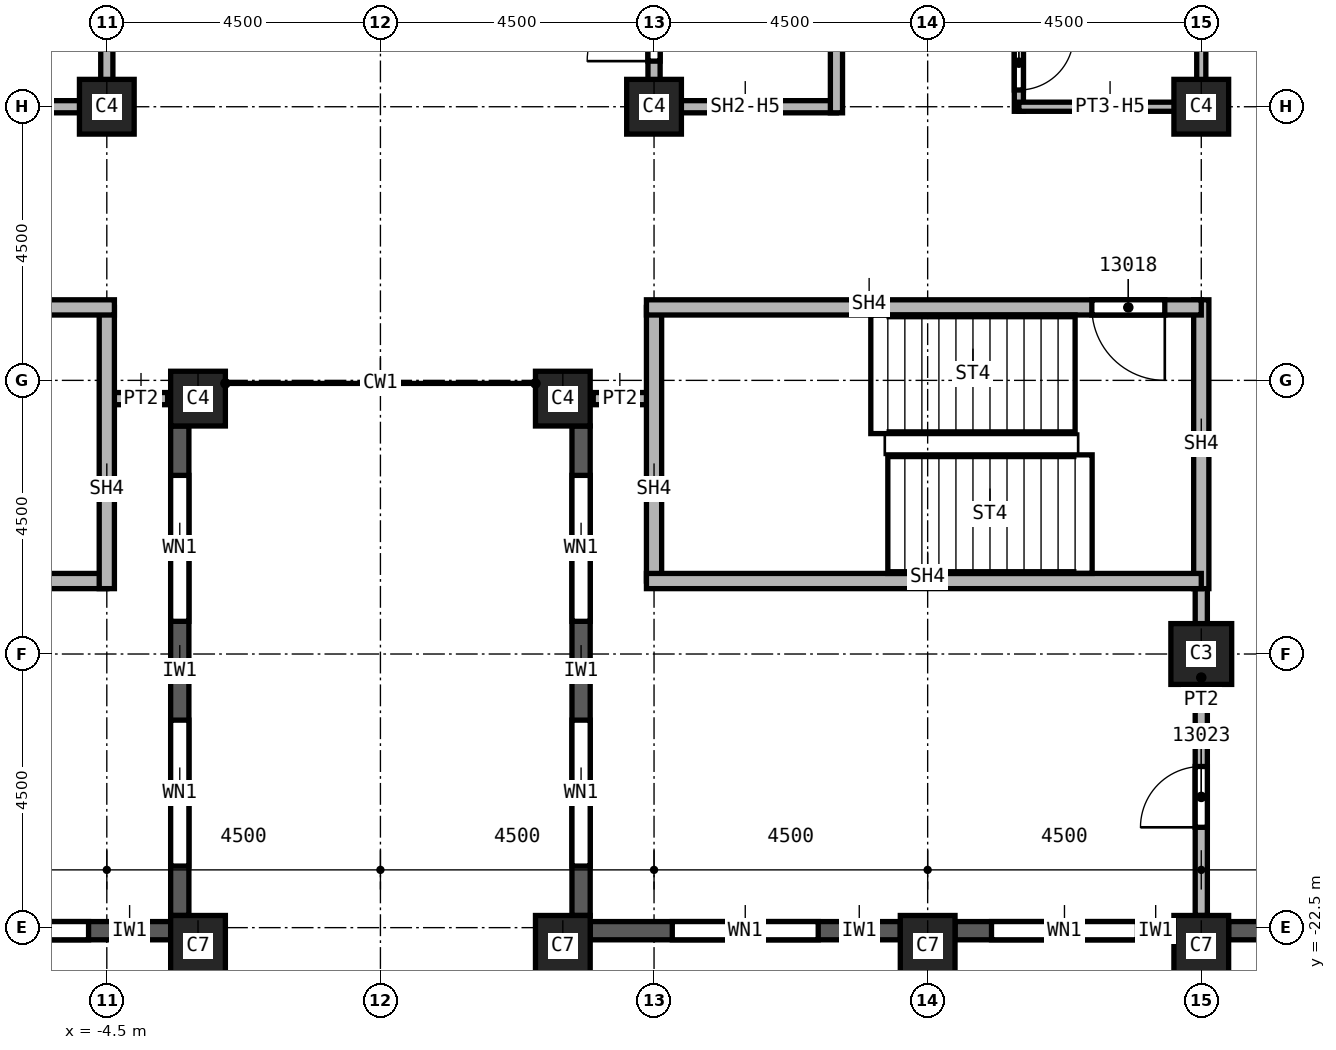
"""IFC4 building model, lengths in metres.
Left out: names, types, materials, properties, quantities, classifications, styles, units other than length and angle.
Written with IfcOpenShell. Run it as: python <this file> out.ifc"""

import sys

from ifc_helpers import new_model, si_unit, direction, frame, frame_2d, origin, origin_2d, place, context, subcontext, project, spatial, rectangle, extrude, element, fill, save


model = new_model("IFC4")
c1 = context("Model", 3, precision=1e-05, world=origin(), true_north=direction((0.0, 1.0)))
c2 = subcontext(c1, "Body", "Model", "MODEL_VIEW")
j1 = project(units=[si_unit("LENGTHUNIT", "METRE"), si_unit("PLANEANGLEUNIT", "RADIAN")], contexts=[c1])
p1 = place(None, origin())
s1 = spatial("IfcSite", under=j1, at=p1, CompositionType="ELEMENT")
p2 = place(p1, origin())
s2 = spatial("IfcBuilding", under=s1, at=p2, CompositionType="ELEMENT")
p3 = place(p2, frame((0.0, 0.0, 208.0)))
s3 = spatial("IfcBuildingStorey", under=s2, at=p3, CompositionType="ELEMENT", Elevation=208.0)
p4 = place(p3, frame((13.5, -18.0, 0.0), z_axis=(0.0, 0.0, 1.0), x_axis=(1.0, 0.0, 0.0)))
e1 = element("IfcColumn", 1, at=p4, inside=s3, PredefinedType="COLUMN", context=c2, shape_type="SweptSolid", body=[
    extrude(rectangle(XDim=1.0, YDim=1.0, at=origin_2d()), origin(), (0.0, 0.0, 1.0), 3.72),
])
for number, where, z_axis, x_axis in (
    (2, (4.5, -9.0, 0.0), (0.0, 0.0, 1.0), (1.0, 0.0, 0.0)),
    (3, (13.5, -9.0, 0.0), (0.0, 0.0, 1.0), (1.0, 0.0, 0.0)),
    (4, (-4.5, -9.0, 0.0), (0.0, 0.0, 1.0), (1.0, 0.0, 0.0)),
):
    element("IfcColumn", number, at=place(p3, frame(where, z_axis=z_axis, x_axis=x_axis)), inside=s3, PredefinedType="COLUMN", context=c2, shape_type="SweptSolid", body=[
        extrude(rectangle(XDim=0.9, YDim=0.9, at=origin_2d()), origin(), (0.0, 0.0, 1.0), 3.72),
    ])
for number, where, z_axis, x_axis in (
    (5, (3.0, -22.8, 0.0), (0.0, 0.0, 1.0), (1.0, 0.0, 0.0)),
    (6, (9.0, -22.8, 0.0), (0.0, 0.0, 1.0), (1.0, 0.0, 0.0)),
    (7, (13.5, -22.8, 0.0), (0.0, 0.0, 1.0), (1.0, 0.0, 0.0)),
    (8, (-3.0, -22.8, 0.0), (0.0, 0.0, 1.0), (1.0, 0.0, 0.0)),
):
    element("IfcColumn", number, at=place(p3, frame(where, z_axis=z_axis, x_axis=x_axis)), inside=s3, PredefinedType="COLUMN", context=c2, shape_type="SweptSolid", body=[
        extrude(rectangle(XDim=0.9, YDim=1.0, at=origin_2d()), origin(), (0.0, 0.0, 1.0), 3.72),
    ])
for number, where, z_axis, x_axis in (
    (9, (3.0, -13.8, 0.0), (0.0, 0.0, 1.0), (1.0, 0.0, 0.0)),
    (10, (-3.0, -13.8, 0.0), (0.0, 0.0, 1.0), (1.0, 0.0, 0.0)),
):
    element("IfcColumn", number, at=place(p3, frame(where, z_axis=z_axis, x_axis=x_axis)), inside=s3, PredefinedType="COLUMN", context=c2, shape_type="SweptSolid", body=[
        extrude(rectangle(XDim=0.9, YDim=0.9, at=origin_2d()), origin(), (0.0, 0.0, 1.0), 3.72),
    ])
p5 = place(p3, frame((-8.55, -22.55, 0.0), z_axis=(0.0, 0.0, 1.0), x_axis=(1.0, 0.0, 0.0)))
e11 = element("IfcWall", 11, at=p5, inside=s3, PredefinedType="SOLIDWALL", context=c2, shape_type="SweptSolid", body=[
    extrude(rectangle(XDim=5.1, YDim=0.3, at=frame_2d((2.55, 0.0))), origin(), (0.0, 0.0, 1.0), 3.12),
])
p6 = place(p5, frame((1.35, 0.0, 0.8)))
e12 = element("IfcOpeningElement", 12, at=p6, cuts=e11, PredefinedType="OPENING", context=c2, shape_type="SweptSolid", body=[
    extrude(rectangle(XDim=2.4, YDim=1.95, at=frame_2d((1.2, 0.975))), frame((0.0, 0.15, 0.0), z_axis=(0.0, -1.0, 0.0), x_axis=(1.0, 0.0, 0.0)), (0.0, 0.0, 1.0), 0.3),
])
p7 = place(p3, frame((-3.3, -22.3, 0.0), z_axis=(0.0, 0.0, 1.0), x_axis=(0.0, 1.0, 0.0)))
e13 = element("IfcWall", 13, at=p7, inside=s3, PredefinedType="SOLIDWALL", context=c2, shape_type="SweptSolid", body=[
    extrude(rectangle(XDim=8.05, YDim=0.3, at=frame_2d((4.025, 0.0))), origin(), (0.0, 0.0, 1.0), 3.12),
])
p8 = place(p7, frame((0.812, 0.0, 0.8)))
e14 = element("IfcOpeningElement", 14, at=p8, cuts=e13, PredefinedType="OPENING", context=c2, shape_type="SweptSolid", body=[
    extrude(rectangle(XDim=2.4, YDim=1.95, at=frame_2d((1.2, 0.975))), frame((0.0, 0.15, 0.0), z_axis=(0.0, -1.0, 0.0), x_axis=(1.0, 0.0, 0.0)), (0.0, 0.0, 1.0), 0.3),
])
p9 = place(p7, frame((4.837, 0.0, 0.8)))
e15 = element("IfcOpeningElement", 15, at=p9, cuts=e13, PredefinedType="OPENING", context=c2, shape_type="SweptSolid", body=[
    extrude(rectangle(XDim=2.4, YDim=1.95, at=frame_2d((1.2, 0.975))), frame((0.0, 0.15, 0.0), z_axis=(0.0, -1.0, 0.0), x_axis=(1.0, 0.0, 0.0)), (0.0, 0.0, 1.0), 0.3),
])
p10 = place(p3, frame((3.3, -14.25, 0.0), z_axis=(0.0, 0.0, 1.0), x_axis=(0.0, -1.0, 0.0)))
e16 = element("IfcWall", 16, at=p10, inside=s3, PredefinedType="SOLIDWALL", context=c2, shape_type="SweptSolid", body=[
    extrude(rectangle(XDim=8.05, YDim=0.3, at=frame_2d((4.025, 0.0))), origin(), (0.0, 0.0, 1.0), 3.12),
])
p11 = place(p10, frame((0.812, 0.0, 0.8)))
e17 = element("IfcOpeningElement", 17, at=p11, cuts=e16, PredefinedType="OPENING", context=c2, shape_type="SweptSolid", body=[
    extrude(rectangle(XDim=2.4, YDim=1.95, at=frame_2d((1.2, 0.975))), frame((0.0, 0.15, 0.0), z_axis=(0.0, -1.0, 0.0), x_axis=(1.0, 0.0, 0.0)), (0.0, 0.0, 1.0), 0.3),
])
p12 = place(p10, frame((4.837, 0.0, 0.8)))
e18 = element("IfcOpeningElement", 18, at=p12, cuts=e16, PredefinedType="OPENING", context=c2, shape_type="SweptSolid", body=[
    extrude(rectangle(XDim=2.4, YDim=1.95, at=frame_2d((1.2, 0.975))), frame((0.0, 0.15, 0.0), z_axis=(0.0, -1.0, 0.0), x_axis=(1.0, 0.0, 0.0)), (0.0, 0.0, 1.0), 0.3),
])
p13 = place(p3, frame((3.45, -22.55, 0.0), z_axis=(0.0, 0.0, 1.0), x_axis=(1.0, 0.0, 0.0)))
e19 = element("IfcWall", 19, at=p13, inside=s3, PredefinedType="SOLIDWALL", context=c2, shape_type="SweptSolid", body=[
    extrude(rectangle(XDim=5.1, YDim=0.3, at=frame_2d((2.55, 0.0))), origin(), (0.0, 0.0, 1.0), 3.12),
])
p14 = place(p13, frame((1.35, 0.0, 0.8)))
e20 = element("IfcOpeningElement", 20, at=p14, cuts=e19, PredefinedType="OPENING", context=c2, shape_type="SweptSolid", body=[
    extrude(rectangle(XDim=2.4, YDim=1.95, at=frame_2d((1.2, 0.975))), frame((0.0, 0.15, 0.0), z_axis=(0.0, -1.0, 0.0), x_axis=(1.0, 0.0, 0.0)), (0.0, 0.0, 1.0), 0.3),
])
p15 = place(p3, frame((9.45, -22.55, 0.0), z_axis=(0.0, 0.0, 1.0), x_axis=(1.0, 0.0, 0.0)))
e21 = element("IfcWall", 21, at=p15, inside=s3, PredefinedType="SOLIDWALL", context=c2, shape_type="SweptSolid", body=[
    extrude(rectangle(XDim=3.6, YDim=0.3, at=frame_2d((1.8, 0.0))), origin(), (0.0, 0.0, 1.0), 3.12),
])
p16 = place(p15, frame((0.6, 0.0, 0.8)))
e22 = element("IfcOpeningElement", 22, at=p16, cuts=e21, PredefinedType="OPENING", context=c2, shape_type="SweptSolid", body=[
    extrude(rectangle(XDim=2.4, YDim=1.95, at=frame_2d((1.2, 0.975))), frame((0.0, 0.15, 0.0), z_axis=(0.0, -1.0, 0.0), x_axis=(1.0, 0.0, 0.0)), (0.0, 0.0, 1.0), 0.3),
])
p17 = place(p3, frame((13.95, -22.55, 0.0), z_axis=(0.0, 0.0, 1.0), x_axis=(1.0, 0.0, 0.0)))
e23 = element("IfcWall", 23, at=p17, inside=s3, PredefinedType="SOLIDWALL", context=c2, shape_type="SweptSolid", body=[
    extrude(rectangle(XDim=3.6, YDim=0.3, at=frame_2d((1.8, 0.0))), origin(), (0.0, 0.0, 1.0), 3.12),
])
p18 = place(p17, frame((0.625, 0.0, 0.8)))
e24 = element("IfcOpeningElement", 24, at=p18, cuts=e23, PredefinedType="OPENING", context=c2, shape_type="SweptSolid", body=[
    extrude(rectangle(XDim=0.6, YDim=1.95, at=frame_2d((0.3, 0.975))), frame((0.0, 0.15, 0.0), z_axis=(0.0, -1.0, 0.0), x_axis=(1.0, 0.0, 0.0)), (0.0, 0.0, 1.0), 0.3),
])
p19 = place(p17, frame((1.825, 0.0, 0.8)))
e25 = element("IfcOpeningElement", 25, at=p19, cuts=e23, PredefinedType="OPENING", context=c2, shape_type="SweptSolid", body=[
    extrude(rectangle(XDim=1.0, YDim=1.95, at=frame_2d((0.5, 0.975))), frame((0.0, 0.15, 0.0), z_axis=(0.0, -1.0, 0.0), x_axis=(1.0, 0.0, 0.0)), (0.0, 0.0, 1.0), 0.3),
])
for number, where, z_axis, x_axis in (
    (26, (-3.5, -13.8, 0.0), (0.0, 0.0, 1.0), (-1.0, 0.0, 0.0)),
    (27, (4.5, -13.8, 0.0), (0.0, 0.0, 1.0), (-1.0, 0.0, 0.0)),
):
    element("IfcWall", number, at=place(p3, frame(where, z_axis=z_axis, x_axis=x_axis)), inside=s3, PredefinedType="PARTITIONING", context=c2, shape_type="SweptSolid", body=[
        extrude(rectangle(XDim=1.0, YDim=0.2, at=frame_2d((0.5, 0.0))), origin(), (0.0, 0.0, 1.0), 3.72),
    ])
p20 = place(p3, frame((13.5, -22.3, 0.0), z_axis=(0.0, 0.0, 1.0), x_axis=(0.0, 1.0, 0.0)))
e28 = element("IfcWall", 28, at=p20, inside=s3, PredefinedType="PARTITIONING", context=c2, shape_type="SweptSolid", body=[
    extrude(rectangle(XDim=5.625, YDim=0.2, at=frame_2d((2.812, 0.0))), origin(), (0.0, 0.0, 1.0), 3.72),
])
p21 = place(p20, frame((1.45, 0.0, 0.0)))
e29 = element("IfcOpeningElement", 29, at=p21, cuts=e28, PredefinedType="OPENING", context=c2, shape_type="SweptSolid", body=[
    extrude(rectangle(XDim=1.0, YDim=2.1, at=frame_2d((0.5, 1.05))), frame((0.0, 0.1, 0.0), z_axis=(0.0, -1.0, 0.0), x_axis=(1.0, 0.0, 0.0)), (0.0, 0.0, 1.0), 0.2),
])
p22 = place(p3, frame((-4.5, -9.0, 0.0), z_axis=(0.0, 0.0, 1.0), x_axis=(-1.0, 0.0, 0.0)))
e30 = element("IfcWall", 30, at=p22, inside=s3, PredefinedType="SOLIDWALL", context=c2, shape_type="SweptSolid", body=[
    extrude(rectangle(XDim=3.0, YDim=0.2, at=frame_2d((1.5, 0.0))), origin(), (0.0, 0.0, 1.0), 2.958),
])
p23 = place(p3, frame((-4.5, 0.0, 0.0), z_axis=(0.0, 0.0, 1.0), x_axis=(0.0, -1.0, 0.0)))
e31 = element("IfcWall", 31, at=p23, inside=s3, PredefinedType="SOLIDWALL", context=c2, shape_type="SweptSolid", body=[
    extrude(rectangle(XDim=9.1, YDim=0.2, at=frame_2d((4.55, 0.0))), origin(), (0.0, 0.0, 1.0), 2.958),
])
p24 = place(p23, frame((1.3, 0.0, 0.0)))
e32 = element("IfcOpeningElement", 32, at=p24, cuts=e31, PredefinedType="OPENING", context=c2, shape_type="SweptSolid", body=[
    extrude(rectangle(XDim=1.1, YDim=2.1, at=frame_2d((0.55, 1.05))), frame((0.0, 0.1, 0.0), z_axis=(0.0, -1.0, 0.0), x_axis=(1.0, 0.0, 0.0)), (0.0, 0.0, 1.0), 0.2),
])
p25 = place(p3, frame((4.5, -9.1, 0.0), z_axis=(0.0, 0.0, 1.0), x_axis=(0.0, 1.0, 0.0)))
e33 = element("IfcWall", 33, at=p25, inside=s3, PredefinedType="SOLIDWALL", context=c2, shape_type="SweptSolid", body=[
    extrude(rectangle(XDim=3.1, YDim=0.2, at=frame_2d((1.55, 0.0))), origin(), (0.0, 0.0, 1.0), 2.958),
])
p26 = place(p25, frame((0.85, 0.0, 0.0)))
e34 = element("IfcOpeningElement", 34, at=p26, cuts=e33, PredefinedType="OPENING", context=c2, shape_type="SweptSolid", body=[
    extrude(rectangle(XDim=1.1, YDim=2.1, at=frame_2d((0.55, 1.05))), frame((0.0, 0.1, 0.0), z_axis=(0.0, -1.0, 0.0), x_axis=(1.0, 0.0, 0.0)), (0.0, 0.0, 1.0), 0.2),
])
p27 = place(p3, frame((7.5, -9.0, 0.0), z_axis=(0.0, 0.0, 1.0), x_axis=(-1.0, 0.0, 0.0)))
e35 = element("IfcWall", 35, at=p27, inside=s3, PredefinedType="SOLIDWALL", context=c2, shape_type="SweptSolid", body=[
    extrude(rectangle(XDim=3.0, YDim=0.2, at=frame_2d((1.5, 0.0))), origin(), (0.0, 0.0, 1.0), 2.958),
])
p28 = place(p3, frame((7.5, -6.0, 0.0), z_axis=(0.0, 0.0, 1.0), x_axis=(0.0, -1.0, 0.0)))
e36 = element("IfcWall", 36, at=p28, inside=s3, PredefinedType="SOLIDWALL", context=c2, shape_type="SweptSolid", body=[
    extrude(rectangle(XDim=3.1, YDim=0.2, at=frame_2d((1.55, 0.0))), origin(), (0.0, 0.0, 1.0), 3.72),
])
p29 = place(p3, frame((-4.5, -16.8, 0.0), z_axis=(0.0, 0.0, 1.0), x_axis=(-1.0, 0.0, 0.0)))
e37 = element("IfcWall", 37, at=p29, inside=s3, PredefinedType="SOLIDWALL", context=c2, shape_type="SweptSolid", body=[
    extrude(rectangle(XDim=9.0, YDim=0.25, at=frame_2d((4.5, 0.0))), origin(), (0.0, 0.0, 1.0), 3.72),
])
p30 = place(p3, frame((-4.5, -12.3, 0.0), z_axis=(0.0, 0.0, 1.0), x_axis=(0.0, -1.0, 0.0)))
e38 = element("IfcWall", 38, at=p30, inside=s3, PredefinedType="SOLIDWALL", context=c2, shape_type="SweptSolid", body=[
    extrude(rectangle(XDim=4.625, YDim=0.25, at=frame_2d((2.312, 0.0))), origin(), (0.0, 0.0, 1.0), 3.72),
])
p31 = place(p3, frame((-4.375, -12.3, 0.0), z_axis=(0.0, 0.0, 1.0), x_axis=(-1.0, 0.0, 0.0)))
e39 = element("IfcWall", 39, at=p31, inside=s3, PredefinedType="SOLIDWALL", context=c2, shape_type="SweptSolid", body=[
    extrude(rectangle(XDim=9.125, YDim=0.25, at=frame_2d((4.562, 0.0))), origin(), (0.0, 0.0, 1.0), 3.72),
])
p32 = place(p31, frame((7.2, 0.0, 0.0)))
e40 = element("IfcOpeningElement", 40, at=p32, cuts=e39, PredefinedType="OPENING", context=c2, shape_type="SweptSolid", body=[
    extrude(rectangle(XDim=1.2, YDim=2.1, at=frame_2d((0.6, 1.05))), frame((0.0, 0.125, 0.0), z_axis=(0.0, -1.0, 0.0), x_axis=(1.0, 0.0, 0.0)), (0.0, 0.0, 1.0), 0.25),
])
p33 = place(p3, frame((4.5, -16.8, 0.0), z_axis=(0.0, 0.0, 1.0), x_axis=(0.0, 1.0, 0.0)))
e41 = element("IfcWall", 41, at=p33, inside=s3, PredefinedType="SOLIDWALL", context=c2, shape_type="SweptSolid", body=[
    extrude(rectangle(XDim=4.5, YDim=0.25, at=frame_2d((2.25, 0.0))), origin(), (0.0, 0.0, 1.0), 3.72),
])
p34 = place(p3, frame((13.5, -16.925, 0.0), z_axis=(0.0, 0.0, 1.0), x_axis=(0.0, 1.0, 0.0)))
e42 = element("IfcWall", 42, at=p34, inside=s3, PredefinedType="SOLIDWALL", context=c2, shape_type="SweptSolid", body=[
    extrude(rectangle(XDim=4.75, YDim=0.25, at=frame_2d((2.375, 0.0))), origin(), (0.0, 0.0, 1.0), 3.72),
])
p35 = place(p3, frame((13.5, -16.8, 0.0), z_axis=(0.0, 0.0, 1.0), x_axis=(-1.0, 0.0, 0.0)))
e43 = element("IfcWall", 43, at=p35, inside=s3, PredefinedType="SOLIDWALL", context=c2, shape_type="SweptSolid", body=[
    extrude(rectangle(XDim=9.125, YDim=0.25, at=frame_2d((4.562, 0.0))), origin(), (0.0, 0.0, 1.0), 3.72),
])
p36 = place(p3, frame((13.5, -12.3, 0.0), z_axis=(0.0, 0.0, 1.0), x_axis=(-1.0, 0.0, 0.0)))
e44 = element("IfcWall", 44, at=p36, inside=s3, PredefinedType="SOLIDWALL", context=c2, shape_type="SweptSolid", body=[
    extrude(rectangle(XDim=9.125, YDim=0.25, at=frame_2d((4.562, 0.0))), origin(), (0.0, 0.0, 1.0), 3.72),
])
p37 = place(p36, frame((0.6, 0.0, 0.0)))
e45 = element("IfcOpeningElement", 45, at=p37, cuts=e44, PredefinedType="OPENING", context=c2, shape_type="SweptSolid", body=[
    extrude(rectangle(XDim=1.2, YDim=2.1, at=frame_2d((0.6, 1.05))), frame((0.0, 0.125, 0.0), z_axis=(0.0, -1.0, 0.0), x_axis=(1.0, 0.0, 0.0)), (0.0, 0.0, 1.0), 0.25),
])
p38 = place(p3, frame((10.5, -4.425, 0.0), z_axis=(0.0, 0.0, 1.0), x_axis=(0.0, -1.0, 0.0)))
e46 = element("IfcWall", 46, at=p38, inside=s3, PredefinedType="PARTITIONING", context=c2, shape_type="SweptSolid", body=[
    extrude(rectangle(XDim=4.65, YDim=0.15, at=frame_2d((2.325, 0.0))), origin(), (0.0, 0.0, 1.0), 3.72),
])
p39 = place(p38, frame((3.4, 0.0, 0.0)))
e47 = element("IfcOpeningElement", 47, at=p39, cuts=e46, PredefinedType="OPENING", context=c2, shape_type="SweptSolid", body=[
    extrude(rectangle(XDim=0.9, YDim=2.1, at=frame_2d((0.45, 1.05))), frame((0.0, 0.075, 0.0), z_axis=(0.0, -1.0, 0.0), x_axis=(1.0, 0.0, 0.0)), (0.0, 0.0, 1.0), 0.15),
])
p40 = place(p3, frame((13.5, -9.0, 0.0), z_axis=(0.0, 0.0, 1.0), x_axis=(-1.0, 0.0, 0.0)))
e48 = element("IfcWall", 48, at=p40, inside=s3, PredefinedType="PARTITIONING", context=c2, shape_type="SweptSolid", body=[
    extrude(rectangle(XDim=3.0, YDim=0.15, at=frame_2d((1.5, 0.0))), origin(), (0.0, 0.0, 1.0), 2.958),
])
p41 = place(p3, frame((13.5, -4.5, 0.0), z_axis=(0.0, 0.0, 1.0), x_axis=(0.0, -1.0, 0.0)))
e49 = element("IfcWall", 49, at=p41, inside=s3, PredefinedType="PARTITIONING", context=c2, shape_type="SweptSolid", body=[
    extrude(rectangle(XDim=4.575, YDim=0.15, at=frame_2d((2.288, 0.0))), origin(), (0.0, 0.0, 1.0), 2.958),
])
p42 = place(p6, origin())
e50 = element("IfcWindow", 50, at=p42, inside=s3, PartitioningType="SINGLE_PANEL", PredefinedType="WINDOW", context=c2, shape_type="SweptSolid", body=[
    extrude(rectangle(XDim=2.4, YDim=1.95, at=frame_2d((1.2, 0.975))), frame((0.0, 0.03, 0.0), z_axis=(0.0, -1.0, 0.0), x_axis=(1.0, 0.0, 0.0)), (0.0, 0.0, 1.0), 0.06),
])
fill(e12, e50)
p43 = place(p8, origin())
e51 = element("IfcWindow", 51, at=p43, inside=s3, PartitioningType="SINGLE_PANEL", PredefinedType="WINDOW", context=c2, shape_type="SweptSolid", body=[
    extrude(rectangle(XDim=2.4, YDim=1.95, at=frame_2d((1.2, 0.975))), frame((0.0, 0.03, 0.0), z_axis=(0.0, -1.0, 0.0), x_axis=(1.0, 0.0, 0.0)), (0.0, 0.0, 1.0), 0.06),
])
fill(e14, e51)
p44 = place(p9, origin())
e52 = element("IfcWindow", 52, at=p44, inside=s3, PartitioningType="SINGLE_PANEL", PredefinedType="WINDOW", context=c2, shape_type="SweptSolid", body=[
    extrude(rectangle(XDim=2.4, YDim=1.95, at=frame_2d((1.2, 0.975))), frame((0.0, 0.03, 0.0), z_axis=(0.0, -1.0, 0.0), x_axis=(1.0, 0.0, 0.0)), (0.0, 0.0, 1.0), 0.06),
])
fill(e15, e52)
p45 = place(p11, origin())
e53 = element("IfcWindow", 53, at=p45, inside=s3, PartitioningType="SINGLE_PANEL", PredefinedType="WINDOW", context=c2, shape_type="SweptSolid", body=[
    extrude(rectangle(XDim=2.4, YDim=1.95, at=frame_2d((1.2, 0.975))), frame((0.0, 0.03, 0.0), z_axis=(0.0, -1.0, 0.0), x_axis=(1.0, 0.0, 0.0)), (0.0, 0.0, 1.0), 0.06),
])
fill(e17, e53)
p46 = place(p12, origin())
e54 = element("IfcWindow", 54, at=p46, inside=s3, PartitioningType="SINGLE_PANEL", PredefinedType="WINDOW", context=c2, shape_type="SweptSolid", body=[
    extrude(rectangle(XDim=2.4, YDim=1.95, at=frame_2d((1.2, 0.975))), frame((0.0, 0.03, 0.0), z_axis=(0.0, -1.0, 0.0), x_axis=(1.0, 0.0, 0.0)), (0.0, 0.0, 1.0), 0.06),
])
fill(e18, e54)
p47 = place(p14, origin())
e55 = element("IfcWindow", 55, at=p47, inside=s3, PartitioningType="SINGLE_PANEL", PredefinedType="WINDOW", context=c2, shape_type="SweptSolid", body=[
    extrude(rectangle(XDim=2.4, YDim=1.95, at=frame_2d((1.2, 0.975))), frame((0.0, 0.03, 0.0), z_axis=(0.0, -1.0, 0.0), x_axis=(1.0, 0.0, 0.0)), (0.0, 0.0, 1.0), 0.06),
])
fill(e20, e55)
p48 = place(p16, origin())
e56 = element("IfcWindow", 56, at=p48, inside=s3, PartitioningType="SINGLE_PANEL", PredefinedType="WINDOW", context=c2, shape_type="SweptSolid", body=[
    extrude(rectangle(XDim=2.4, YDim=1.95, at=frame_2d((1.2, 0.975))), frame((0.0, 0.03, 0.0), z_axis=(0.0, -1.0, 0.0), x_axis=(1.0, 0.0, 0.0)), (0.0, 0.0, 1.0), 0.06),
])
fill(e22, e56)
p49 = place(p26, origin())
e57 = element("IfcDoor", 57, at=p49, inside=s3, OperationType="SINGLE_SWING_LEFT", PredefinedType="DOOR", context=c2, shape_type="SweptSolid", body=[
    extrude(rectangle(XDim=1.1, YDim=2.1, at=frame_2d((0.55, 1.05))), frame((0.0, 0.025, 0.0), z_axis=(0.0, -1.0, 0.0), x_axis=(1.0, 0.0, 0.0)), (0.0, 0.0, 1.0), 0.05),
])
fill(e34, e57)
p50 = place(p39, origin())
e58 = element("IfcDoor", 58, at=p50, inside=s3, OperationType="SINGLE_SWING_LEFT", PredefinedType="DOOR", context=c2, shape_type="SweptSolid", body=[
    extrude(rectangle(XDim=0.9, YDim=2.1, at=frame_2d((0.45, 1.05))), frame((0.0, 0.025, 0.0), z_axis=(0.0, -1.0, 0.0), x_axis=(1.0, 0.0, 0.0)), (0.0, 0.0, 1.0), 0.05),
])
fill(e47, e58)
p51 = place(p37, origin())
e59 = element("IfcDoor", 59, at=p51, inside=s3, OperationType="SINGLE_SWING_LEFT", PredefinedType="DOOR", context=c2, shape_type="SweptSolid", body=[
    extrude(rectangle(XDim=1.2, YDim=2.1, at=frame_2d((0.6, 1.05))), frame((0.0, 0.025, 0.0), z_axis=(0.0, -1.0, 0.0), x_axis=(1.0, 0.0, 0.0)), (0.0, 0.0, 1.0), 0.05),
])
fill(e45, e59)
p52 = place(p21, origin())
e60 = element("IfcDoor", 60, at=p52, inside=s3, OperationType="SINGLE_SWING_RIGHT", PredefinedType="DOOR", context=c2, shape_type="SweptSolid", body=[
    extrude(rectangle(XDim=1.0, YDim=2.1, at=frame_2d((0.5, 1.05))), frame((0.0, 0.025, 0.0), z_axis=(0.0, -1.0, 0.0), x_axis=(1.0, 0.0, 0.0)), (0.0, 0.0, 1.0), 0.05),
])
fill(e29, e60)
save(model, sys.argv[1])
